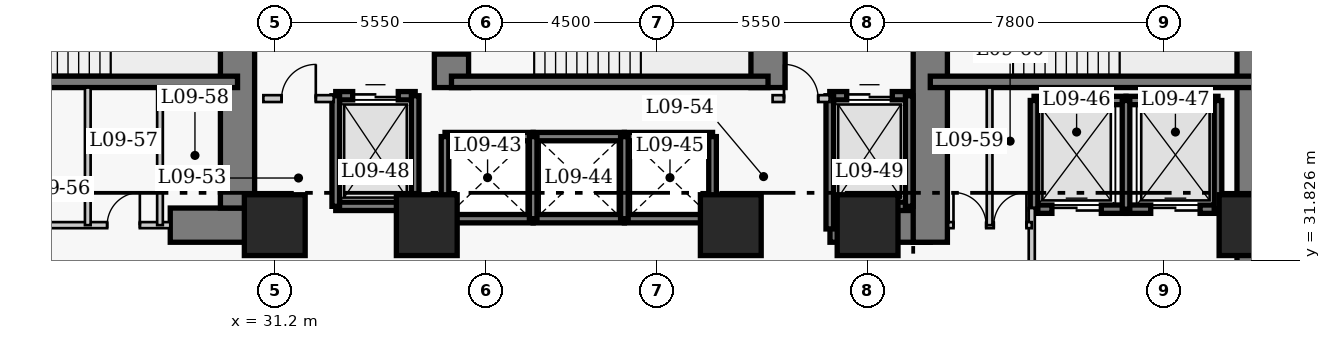
"""IFC4 building model, lengths in metres.
Left out: names, types, materials, properties, quantities, classifications, styles, units other than length and angle.
Written with IfcOpenShell. Run it as: python <this file> out.ifc"""

import sys

from ifc_helpers import new_model, si_unit, direction, frame, frame_2d, origin, origin_2d, place, context, subcontext, project, spatial, rectangle, extrude, element, fill, save


model = new_model("IFC4")
c1 = context("Model", 3, precision=1e-05, world=origin(), true_north=direction((0.0, 1.0)))
c2 = subcontext(c1, "Body", "Model", "MODEL_VIEW")
j1 = project(units=[si_unit("LENGTHUNIT", "METRE"), si_unit("PLANEANGLEUNIT", "RADIAN")], contexts=[c1])
p1 = place(None, origin())
s1 = spatial("IfcSite", under=j1, at=p1, CompositionType="ELEMENT")
p2 = place(p1, origin())
s2 = spatial("IfcBuilding", under=s1, at=p2, CompositionType="ELEMENT")
p3 = place(p2, frame((0.0, 0.0, 41.2)))
s3 = spatial("IfcBuildingStorey", under=s2, at=p3, CompositionType="ELEMENT", Elevation=41.2)
p4 = place(p3, frame((56.97, 27.05, 0.0), z_axis=(0.0, 0.0, 1.0), x_axis=(0.0, 1.0, 0.0)))
e1 = element("IfcWall", 1, at=p4, inside=s3, PredefinedType="SHEAR", context=c2, shape_type="SweptSolid", body=[
    extrude(rectangle(XDim=13.72, YDim=0.9, at=frame_2d((6.86, 0.0))), origin(), (0.0, 0.0, 1.0), 3.8),
])
p5 = place(p3, frame((28.45, 32.75, 0.0), z_axis=(0.0, 0.0, 1.0), x_axis=(1.0, 0.0, 0.0)))
e2 = element("IfcWall", 2, at=p5, inside=s3, PredefinedType="SHEAR", context=c2, shape_type="SweptSolid", body=[
    extrude(rectangle(XDim=2.4, YDim=0.9, at=frame_2d((1.2, 0.0))), origin(), (0.0, 0.0, 1.0), 3.8),
])
p6 = place(p3, frame((45.81, 32.75, 0.0), z_axis=(0.0, 0.0, 1.0), x_axis=(1.0, 0.0, 0.0)))
e3 = element("IfcWall", 3, at=p6, inside=s3, PredefinedType="SHEAR", context=c2, shape_type="SweptSolid", body=[
    extrude(rectangle(XDim=2.64, YDim=0.9, at=frame_2d((1.32, 0.0))), origin(), (0.0, 0.0, 1.0), 3.8),
])
p7 = place(p3, frame((30.22, 33.2, 0.0), z_axis=(0.0, 0.0, 1.0), x_axis=(0.0, 1.0, 0.0)))
e4 = element("IfcWall", 4, at=p7, inside=s3, PredefinedType="SHEAR", context=c2, shape_type="SweptSolid", body=[
    extrude(rectangle(XDim=7.12, YDim=0.9, at=frame_2d((3.56, 0.0))), origin(), (0.0, 0.0, 1.0), 3.8),
])
p8 = place(p3, frame((35.85, 36.37, 0.0), z_axis=(0.0, 0.0, 1.0), x_axis=(0.0, 1.0, 0.0)))
e5 = element("IfcWall", 5, at=p8, inside=s3, PredefinedType="SHEAR", context=c2, shape_type="SweptSolid", body=[
    extrude(rectangle(XDim=3.95, YDim=0.9, at=frame_2d((1.975, 0.0))), origin(), (0.0, 0.0, 1.0), 3.8),
])
p9 = place(p8, frame((0.88, 0.0, 0.0)))
e6 = element("IfcOpeningElement", 6, at=p9, cuts=e5, PredefinedType="OPENING", context=c2, shape_type="SweptSolid", body=[
    extrude(rectangle(XDim=1.1, YDim=2.15, at=frame_2d((0.55, 1.075))), frame((0.0, 0.46, 0.0), z_axis=(0.0, -1.0, 0.0), x_axis=(1.0, 0.0, 0.0)), (0.0, 0.0, 1.0), 0.92),
])
p10 = place(p3, frame((44.18, 36.37, 0.0), z_axis=(0.0, 0.0, 1.0), x_axis=(0.0, 1.0, 0.0)))
e7 = element("IfcWall", 7, at=p10, inside=s3, PredefinedType="SHEAR", context=c2, shape_type="SweptSolid", body=[
    extrude(rectangle(XDim=3.95, YDim=0.9, at=frame_2d((1.975, 0.0))), origin(), (0.0, 0.0, 1.0), 3.8),
])
p11 = place(p3, frame((48.45, 32.3, 0.0), z_axis=(0.0, 0.0, 1.0), x_axis=(0.0, 1.0, 0.0)))
e8 = element("IfcWall", 8, at=p11, inside=s3, PredefinedType="SHEAR", context=c2, shape_type="SweptSolid", body=[
    extrude(rectangle(XDim=8.02, YDim=0.9, at=frame_2d((4.01, 0.0))), origin(), (0.0, 0.0, 1.0), 3.8),
])
p12 = place(p11, frame((5.9, 0.0, 0.0)))
e9 = element("IfcOpeningElement", 9, at=p12, cuts=e8, PredefinedType="OPENING", context=c2, shape_type="SweptSolid", body=[
    extrude(rectangle(XDim=1.1, YDim=2.15, at=frame_2d((0.55, 1.075))), frame((0.0, 0.46, 0.0), z_axis=(0.0, -1.0, 0.0), x_axis=(1.0, 0.0, 0.0)), (0.0, 0.0, 1.0), 0.92),
])
p13 = place(p3, frame((21.9, 36.52, 0.0), z_axis=(0.0, 0.0, 1.0), x_axis=(1.0, 0.0, 0.0)))
e10 = element("IfcWall", 10, at=p13, inside=s3, PredefinedType="SHEAR", context=c2, shape_type="SweptSolid", body=[
    extrude(rectangle(XDim=8.32, YDim=0.3, at=frame_2d((4.16, 0.0))), origin(), (0.0, 0.0, 1.0), 3.8),
])
p14 = place(p13, frame((0.9, 0.0, 0.0)))
e11 = element("IfcOpeningElement", 11, at=p14, cuts=e10, PredefinedType="OPENING", context=c2, shape_type="SweptSolid", body=[
    extrude(rectangle(XDim=1.1, YDim=2.15, at=frame_2d((0.55, 1.075))), frame((0.0, 0.16, 0.0), z_axis=(0.0, -1.0, 0.0), x_axis=(1.0, 0.0, 0.0)), (0.0, 0.0, 1.0), 0.32),
])
p15 = place(p3, frame((35.85, 36.52, 0.0), z_axis=(0.0, 0.0, 1.0), x_axis=(1.0, 0.0, 0.0)))
e12 = element("IfcWall", 12, at=p15, inside=s3, PredefinedType="SHEAR", context=c2, shape_type="SweptSolid", body=[
    extrude(rectangle(XDim=8.33, YDim=0.3, at=frame_2d((4.165, 0.0))), origin(), (0.0, 0.0, 1.0), 3.8),
])
p16 = place(p3, frame((48.45, 36.52, 0.0), z_axis=(0.0, 0.0, 1.0), x_axis=(1.0, 0.0, 0.0)))
e13 = element("IfcWall", 13, at=p16, inside=s3, PredefinedType="SHEAR", context=c2, shape_type="SweptSolid", body=[
    extrude(rectangle(XDim=8.52, YDim=0.3, at=frame_2d((4.26, 0.0))), origin(), (0.0, 0.0, 1.0), 3.8),
])
for number, where, z_axis, x_axis in (
    (14, (31.2, 32.75, 0.0), (0.0, 0.0, 1.0), (1.0, 0.0, 0.0)),
    (15, (35.2, 32.75, 0.0), (0.0, 0.0, 1.0), (1.0, 0.0, 0.0)),
    (16, (43.2, 32.75, 0.0), (0.0, 0.0, 1.0), (1.0, 0.0, 0.0)),
    (17, (46.8, 32.75, 0.0), (0.0, 0.0, 1.0), (1.0, 0.0, 0.0)),
    (18, (56.85, 32.75, 0.0), (0.0, 0.0, 1.0), (1.0, 0.0, 0.0)),
):
    element("IfcColumn", number, at=place(p3, frame(where, z_axis=z_axis, x_axis=x_axis)), inside=s3, PredefinedType="COLUMN", context=c2, shape_type="SweptSolid", body=[
        extrude(rectangle(XDim=1.6, YDim=1.6, at=origin_2d()), origin(), (0.0, 0.0, 1.0), 3.8),
    ])
for number, where, z_axis, x_axis in (
    (19, (35.68, 35.08, 0.0), (0.0, 0.0, 1.0), (1.0, 0.0, 0.0)),
    (20, (35.68, 32.92, 0.0), (0.0, 0.0, 1.0), (1.0, 0.0, 0.0)),
):
    element("IfcWall", number, at=place(p3, frame(where, z_axis=z_axis, x_axis=x_axis)), inside=s3, PredefinedType="SHEAR", context=c2, shape_type="SweptSolid", body=[
        extrude(rectangle(XDim=2.32, YDim=0.22, at=frame_2d((1.16, 0.0))), origin(), (0.0, 0.0, 1.0), 3.8),
    ])
p17 = place(p3, frame((35.68, 32.92, 0.0), z_axis=(0.0, 0.0, 1.0), x_axis=(0.0, 1.0, 0.0)))
e21 = element("IfcWall", 21, at=p17, inside=s3, PredefinedType="SHEAR", context=c2, shape_type="SweptSolid", body=[
    extrude(rectangle(XDim=2.16, YDim=0.2, at=frame_2d((1.08, 0.0))), origin(), (0.0, 0.0, 1.0), 3.8),
])
for number, where, z_axis, x_axis in (
    (22, (38.0, 35.08, 0.0), (0.0, 0.0, 1.0), (1.0, 0.0, 0.0)),
    (23, (38.0, 32.92, 0.0), (0.0, 0.0, 1.0), (1.0, 0.0, 0.0)),
):
    element("IfcWall", number, at=place(p3, frame(where, z_axis=z_axis, x_axis=x_axis)), inside=s3, PredefinedType="SHEAR", context=c2, shape_type="SweptSolid", body=[
        extrude(rectangle(XDim=2.4, YDim=0.22, at=frame_2d((1.2, 0.0))), origin(), (0.0, 0.0, 1.0), 3.8),
    ])
p18 = place(p3, frame((38.0, 32.92, 0.0), z_axis=(0.0, 0.0, 1.0), x_axis=(0.0, 1.0, 0.0)))
e24 = element("IfcWall", 24, at=p18, inside=s3, PredefinedType="SHEAR", context=c2, shape_type="SweptSolid", body=[
    extrude(rectangle(XDim=2.16, YDim=0.2, at=frame_2d((1.08, 0.0))), origin(), (0.0, 0.0, 1.0), 3.8),
])
for number, where, z_axis, x_axis in (
    (25, (40.4, 35.08, 0.0), (0.0, 0.0, 1.0), (1.0, 0.0, 0.0)),
    (26, (40.4, 32.92, 0.0), (0.0, 0.0, 1.0), (1.0, 0.0, 0.0)),
):
    element("IfcWall", number, at=place(p3, frame(where, z_axis=z_axis, x_axis=x_axis)), inside=s3, PredefinedType="SHEAR", context=c2, shape_type="SweptSolid", body=[
        extrude(rectangle(XDim=2.32, YDim=0.22, at=frame_2d((1.16, 0.0))), origin(), (0.0, 0.0, 1.0), 3.8),
    ])
for number, where, z_axis, x_axis in (
    (27, (40.4, 32.92, 0.0), (0.0, 0.0, 1.0), (0.0, 1.0, 0.0)),
    (28, (42.72, 32.92, 0.0), (0.0, 0.0, 1.0), (0.0, 1.0, 0.0)),
):
    element("IfcWall", number, at=place(p3, frame(where, z_axis=z_axis, x_axis=x_axis)), inside=s3, PredefinedType="SHEAR", context=c2, shape_type="SweptSolid", body=[
        extrude(rectangle(XDim=2.16, YDim=0.2, at=frame_2d((1.08, 0.0))), origin(), (0.0, 0.0, 1.0), 3.8),
    ])
p19 = place(p3, frame((51.18, 36.03, 0.0), z_axis=(0.0, 0.0, 1.0), x_axis=(1.0, 0.0, 0.0)))
e29 = element("IfcWall", 29, at=p19, inside=s3, PredefinedType="SHEAR", context=c2, shape_type="SweptSolid", body=[
    extrude(rectangle(XDim=2.42, YDim=0.22, at=frame_2d((1.21, 0.0))), origin(), (0.0, 0.0, 1.0), 3.8),
])
p20 = place(p3, frame((51.18, 33.17, 0.0), z_axis=(0.0, 0.0, 1.0), x_axis=(1.0, 0.0, 0.0)))
e30 = element("IfcWall", 30, at=p20, inside=s3, PredefinedType="SHEAR", context=c2, shape_type="SweptSolid", body=[
    extrude(rectangle(XDim=2.42, YDim=0.22, at=frame_2d((1.21, 0.0))), origin(), (0.0, 0.0, 1.0), 3.8),
])
p21 = place(p20, frame((0.47, 0.0, 0.0)))
e31 = element("IfcOpeningElement", 31, at=p21, cuts=e30, PredefinedType="OPENING", context=c2, shape_type="SweptSolid", body=[
    extrude(rectangle(XDim=1.3, YDim=2.15, at=frame_2d((0.65, 1.075))), frame((0.0, 0.12, 0.0), z_axis=(0.0, -1.0, 0.0), x_axis=(1.0, 0.0, 0.0)), (0.0, 0.0, 1.0), 0.24),
])
p22 = place(p3, frame((51.18, 33.17, 0.0), z_axis=(0.0, 0.0, 1.0), x_axis=(0.0, 1.0, 0.0)))
e32 = element("IfcWall", 32, at=p22, inside=s3, PredefinedType="SHEAR", context=c2, shape_type="SweptSolid", body=[
    extrude(rectangle(XDim=2.86, YDim=0.2, at=frame_2d((1.43, 0.0))), origin(), (0.0, 0.0, 1.0), 3.8),
])
p23 = place(p3, frame((53.6, 36.03, 0.0), z_axis=(0.0, 0.0, 1.0), x_axis=(1.0, 0.0, 0.0)))
e33 = element("IfcWall", 33, at=p23, inside=s3, PredefinedType="SHEAR", context=c2, shape_type="SweptSolid", body=[
    extrude(rectangle(XDim=2.42, YDim=0.22, at=frame_2d((1.21, 0.0))), origin(), (0.0, 0.0, 1.0), 3.8),
])
p24 = place(p3, frame((53.6, 33.17, 0.0), z_axis=(0.0, 0.0, 1.0), x_axis=(1.0, 0.0, 0.0)))
e34 = element("IfcWall", 34, at=p24, inside=s3, PredefinedType="SHEAR", context=c2, shape_type="SweptSolid", body=[
    extrude(rectangle(XDim=2.42, YDim=0.22, at=frame_2d((1.21, 0.0))), origin(), (0.0, 0.0, 1.0), 3.8),
])
p25 = place(p24, frame((0.65, 0.0, 0.0)))
e35 = element("IfcOpeningElement", 35, at=p25, cuts=e34, PredefinedType="OPENING", context=c2, shape_type="SweptSolid", body=[
    extrude(rectangle(XDim=1.3, YDim=2.15, at=frame_2d((0.65, 1.075))), frame((0.0, 0.12, 0.0), z_axis=(0.0, -1.0, 0.0), x_axis=(1.0, 0.0, 0.0)), (0.0, 0.0, 1.0), 0.24),
])
for number, where, z_axis, x_axis in (
    (36, (53.6, 33.17, 0.0), (0.0, 0.0, 1.0), (0.0, 1.0, 0.0)),
    (37, (56.02, 33.17, 0.0), (0.0, 0.0, 1.0), (0.0, 1.0, 0.0)),
):
    element("IfcWall", number, at=place(p3, frame(where, z_axis=z_axis, x_axis=x_axis)), inside=s3, PredefinedType="SHEAR", context=c2, shape_type="SweptSolid", body=[
        extrude(rectangle(XDim=2.86, YDim=0.2, at=frame_2d((1.43, 0.0))), origin(), (0.0, 0.0, 1.0), 3.8),
    ])
p26 = place(p3, frame((32.805, 36.155, 0.0), z_axis=(0.0, 0.0, 1.0), x_axis=(1.0, 0.0, 0.0)))
e38 = element("IfcWall", 38, at=p26, inside=s3, PredefinedType="SHEAR", context=c2, shape_type="SweptSolid", body=[
    extrude(rectangle(XDim=2.09, YDim=0.22, at=frame_2d((1.045, 0.0))), origin(), (0.0, 0.0, 1.0), 3.8),
])
p27 = place(p26, frame((0.445, 0.0, 0.0)))
e39 = element("IfcOpeningElement", 39, at=p27, cuts=e38, PredefinedType="OPENING", context=c2, shape_type="SweptSolid", body=[
    extrude(rectangle(XDim=1.2, YDim=2.15, at=frame_2d((0.6, 1.075))), frame((0.0, 0.12, 0.0), z_axis=(0.0, -1.0, 0.0), x_axis=(1.0, 0.0, 0.0)), (0.0, 0.0, 1.0), 0.24),
])
p28 = place(p3, frame((32.805, 33.245, 0.0), z_axis=(0.0, 0.0, 1.0), x_axis=(1.0, 0.0, 0.0)))
e40 = element("IfcWall", 40, at=p28, inside=s3, PredefinedType="SHEAR", context=c2, shape_type="SweptSolid", body=[
    extrude(rectangle(XDim=2.09, YDim=0.22, at=frame_2d((1.045, 0.0))), origin(), (0.0, 0.0, 1.0), 3.8),
])
for number, where, z_axis, x_axis in (
    (41, (32.805, 33.245, 0.0), (0.0, 0.0, 1.0), (0.0, 1.0, 0.0)),
    (42, (34.895, 33.245, 0.0), (0.0, 0.0, 1.0), (0.0, 1.0, 0.0)),
):
    element("IfcWall", number, at=place(p3, frame(where, z_axis=z_axis, x_axis=x_axis)), inside=s3, PredefinedType="SHEAR", context=c2, shape_type="SweptSolid", body=[
        extrude(rectangle(XDim=2.91, YDim=0.2, at=frame_2d((1.455, 0.0))), origin(), (0.0, 0.0, 1.0), 3.8),
    ])
p29 = place(p3, frame((45.805, 36.155, 0.0), z_axis=(0.0, 0.0, 1.0), x_axis=(1.0, 0.0, 0.0)))
e43 = element("IfcWall", 43, at=p29, inside=s3, PredefinedType="SHEAR", context=c2, shape_type="SweptSolid", body=[
    extrude(rectangle(XDim=2.09, YDim=0.22, at=frame_2d((1.045, 0.0))), origin(), (0.0, 0.0, 1.0), 3.8),
])
p30 = place(p29, frame((0.445, 0.0, 0.0)))
e44 = element("IfcOpeningElement", 44, at=p30, cuts=e43, PredefinedType="OPENING", context=c2, shape_type="SweptSolid", body=[
    extrude(rectangle(XDim=1.2, YDim=2.15, at=frame_2d((0.6, 1.075))), frame((0.0, 0.12, 0.0), z_axis=(0.0, -1.0, 0.0), x_axis=(1.0, 0.0, 0.0)), (0.0, 0.0, 1.0), 0.24),
])
p31 = place(p3, frame((45.805, 33.245, 0.0), z_axis=(0.0, 0.0, 1.0), x_axis=(1.0, 0.0, 0.0)))
e45 = element("IfcWall", 45, at=p31, inside=s3, PredefinedType="SHEAR", context=c2, shape_type="SweptSolid", body=[
    extrude(rectangle(XDim=2.09, YDim=0.22, at=frame_2d((1.045, 0.0))), origin(), (0.0, 0.0, 1.0), 3.8),
])
p32 = place(p3, frame((45.805, 32.65, 0.0), z_axis=(0.0, 0.0, 1.0), x_axis=(0.0, 1.0, 0.0)))
e46 = element("IfcWall", 46, at=p32, inside=s3, PredefinedType="SHEAR", context=c2, shape_type="SweptSolid", body=[
    extrude(rectangle(XDim=3.505, YDim=0.2, at=frame_2d((1.752, 0.0))), origin(), (0.0, 0.0, 1.0), 3.8),
])
p33 = place(p3, frame((47.895, 33.245, 0.0), z_axis=(0.0, 0.0, 1.0), x_axis=(0.0, 1.0, 0.0)))
e47 = element("IfcWall", 47, at=p33, inside=s3, PredefinedType="SHEAR", context=c2, shape_type="SweptSolid", body=[
    extrude(rectangle(XDim=2.91, YDim=0.2, at=frame_2d((1.455, 0.0))), origin(), (0.0, 0.0, 1.0), 3.8),
])
p34 = place(p3, frame((30.9, 36.08, 0.0), z_axis=(0.0, 0.0, 1.0), x_axis=(1.0, 0.0, 0.0)))
e48 = element("IfcWall", 48, at=p34, inside=s3, PredefinedType="PARTITIONING", context=c2, shape_type="SweptSolid", body=[
    extrude(rectangle(XDim=1.85, YDim=0.18, at=frame_2d((0.925, 0.0))), origin(), (0.0, 0.0, 1.0), 3.54),
])
p35 = place(p34, frame((0.48, 0.0, 0.0)))
e49 = element("IfcOpeningElement", 49, at=p35, cuts=e48, PredefinedType="OPENING", context=c2, shape_type="SweptSolid", body=[
    extrude(rectangle(XDim=0.9, YDim=2.15, at=frame_2d((0.45, 1.075))), frame((0.0, 0.1, 0.0), z_axis=(0.0, -1.0, 0.0), x_axis=(1.0, 0.0, 0.0)), (0.0, 0.0, 1.0), 0.2),
])
p36 = place(p3, frame((44.3, 36.08, 0.0), z_axis=(0.0, 0.0, 1.0), x_axis=(1.0, 0.0, 0.0)))
e50 = element("IfcWall", 50, at=p36, inside=s3, PredefinedType="PARTITIONING", context=c2, shape_type="SweptSolid", body=[
    extrude(rectangle(XDim=1.5, YDim=0.18, at=frame_2d((0.75, 0.0))), origin(), (0.0, 0.0, 1.0), 3.54),
])
p37 = place(p36, frame((0.3, 0.0, 0.0)))
e51 = element("IfcOpeningElement", 51, at=p37, cuts=e50, PredefinedType="OPENING", context=c2, shape_type="SweptSolid", body=[
    extrude(rectangle(XDim=0.9, YDim=2.15, at=frame_2d((0.45, 1.075))), frame((0.0, 0.1, 0.0), z_axis=(0.0, -1.0, 0.0), x_axis=(1.0, 0.0, 0.0)), (0.0, 0.0, 1.0), 0.2),
])
p38 = place(p3, frame((51.12, 29.5, 0.0), z_axis=(0.0, 0.0, 1.0), x_axis=(0.0, 1.0, 0.0)))
e52 = element("IfcWall", 52, at=p38, inside=s3, PredefinedType="PARTITIONING", context=c2, shape_type="SweptSolid", body=[
    extrude(rectangle(XDim=3.7, YDim=0.16, at=frame_2d((1.85, 0.0))), origin(), (0.0, 0.0, 1.0), 3.54),
])
p39 = place(p38, frame((0.9, 0.0, 0.0)))
e53 = element("IfcOpeningElement", 53, at=p39, cuts=e52, PredefinedType="OPENING", context=c2, shape_type="SweptSolid", body=[
    extrude(rectangle(XDim=1.1, YDim=2.15, at=frame_2d((0.55, 1.075))), frame((0.0, 0.09, 0.0), z_axis=(0.0, -1.0, 0.0), x_axis=(1.0, 0.0, 0.0)), (0.0, 0.0, 1.0), 0.18),
])
p40 = place(p3, frame((24.48, 32.75, 0.0), z_axis=(0.0, 0.0, 1.0), x_axis=(1.0, 0.0, 0.0)))
e54 = element("IfcWall", 54, at=p40, inside=s3, PredefinedType="PARTITIONING", context=c2, shape_type="SweptSolid", body=[
    extrude(rectangle(XDim=3.97, YDim=0.16, at=frame_2d((1.985, 0.0))), origin(), (0.0, 0.0, 1.0), 3.54),
])
p41 = place(p40, frame((2.31, 0.0, 0.0)))
e55 = element("IfcOpeningElement", 55, at=p41, cuts=e54, PredefinedType="OPENING", context=c2, shape_type="SweptSolid", body=[
    extrude(rectangle(XDim=0.86, YDim=2.05, at=frame_2d((0.43, 1.025))), frame((0.0, 0.09, 0.0), z_axis=(0.0, -1.0, 0.0), x_axis=(1.0, 0.0, 0.0)), (0.0, 0.0, 1.0), 0.18),
])
p42 = place(p3, frame((48.92, 32.75, 0.0), z_axis=(0.0, 0.0, 1.0), x_axis=(1.0, 0.0, 0.0)))
e56 = element("IfcWall", 56, at=p42, inside=s3, PredefinedType="PARTITIONING", context=c2, shape_type="SweptSolid", body=[
    extrude(rectangle(XDim=2.2, YDim=0.16, at=frame_2d((1.1, 0.0))), origin(), (0.0, 0.0, 1.0), 3.54),
])
p43 = place(p42, frame((0.14, 0.0, 0.0)))
e57 = element("IfcOpeningElement", 57, at=p43, cuts=e56, PredefinedType="OPENING", context=c2, shape_type="SweptSolid", body=[
    extrude(rectangle(XDim=0.86, YDim=2.05, at=frame_2d((0.43, 1.025))), frame((0.0, 0.09, 0.0), z_axis=(0.0, -1.0, 0.0), x_axis=(1.0, 0.0, 0.0)), (0.0, 0.0, 1.0), 0.18),
])
p44 = place(p42, frame((1.2, 0.0, 0.0)))
e58 = element("IfcOpeningElement", 58, at=p44, cuts=e56, PredefinedType="OPENING", context=c2, shape_type="SweptSolid", body=[
    extrude(rectangle(XDim=0.86, YDim=2.05, at=frame_2d((0.43, 1.025))), frame((0.0, 0.09, 0.0), z_axis=(0.0, -1.0, 0.0), x_axis=(1.0, 0.0, 0.0)), (0.0, 0.0, 1.0), 0.18),
])
for number, where, z_axis, x_axis in (
    (59, (26.28, 32.75, 0.0), (0.0, 0.0, 1.0), (0.0, 1.0, 0.0)),
    (60, (28.18, 32.75, 0.0), (0.0, 0.0, 1.0), (0.0, 1.0, 0.0)),
    (61, (50.01, 32.75, 0.0), (0.0, 0.0, 1.0), (0.0, 1.0, 0.0)),
):
    element("IfcWall", number, at=place(p3, frame(where, z_axis=z_axis, x_axis=x_axis)), inside=s3, PredefinedType="PARTITIONING", context=c2, shape_type="SweptSolid", body=[
        extrude(rectangle(XDim=3.62, YDim=0.15, at=frame_2d((1.81, 0.0))), origin(), (0.0, 0.0, 1.0), 3.54),
    ])
p45 = place(p21, origin())
e62 = element("IfcDoor", 62, at=p45, inside=s3, OperationType="DOUBLE_DOOR_SLIDING", PredefinedType="DOOR", context=c2, shape_type="SweptSolid", body=[
    extrude(rectangle(XDim=1.3, YDim=2.15, at=frame_2d((0.65, 1.075))), frame((0.0, 0.025, 0.0), z_axis=(0.0, -1.0, 0.0), x_axis=(1.0, 0.0, 0.0)), (0.0, 0.0, 1.0), 0.05),
])
fill(e31, e62)
p46 = place(p25, origin())
e63 = element("IfcDoor", 63, at=p46, inside=s3, OperationType="DOUBLE_DOOR_SLIDING", PredefinedType="DOOR", context=c2, shape_type="SweptSolid", body=[
    extrude(rectangle(XDim=1.3, YDim=2.15, at=frame_2d((0.65, 1.075))), frame((0.0, 0.025, 0.0), z_axis=(0.0, -1.0, 0.0), x_axis=(1.0, 0.0, 0.0)), (0.0, 0.0, 1.0), 0.05),
])
fill(e35, e63)
p47 = place(p27, origin())
e64 = element("IfcDoor", 64, at=p47, inside=s3, OperationType="DOUBLE_DOOR_SLIDING", PredefinedType="DOOR", context=c2, shape_type="SweptSolid", body=[
    extrude(rectangle(XDim=1.2, YDim=2.15, at=frame_2d((0.6, 1.075))), frame((0.0, 0.025, 0.0), z_axis=(0.0, -1.0, 0.0), x_axis=(1.0, 0.0, 0.0)), (0.0, 0.0, 1.0), 0.05),
])
fill(e39, e64)
p48 = place(p30, origin())
e65 = element("IfcDoor", 65, at=p48, inside=s3, OperationType="DOUBLE_DOOR_SLIDING", PredefinedType="DOOR", context=c2, shape_type="SweptSolid", body=[
    extrude(rectangle(XDim=1.2, YDim=2.15, at=frame_2d((0.6, 1.075))), frame((0.0, 0.025, 0.0), z_axis=(0.0, -1.0, 0.0), x_axis=(1.0, 0.0, 0.0)), (0.0, 0.0, 1.0), 0.05),
])
fill(e44, e65)
p49 = place(p35, origin())
e66 = element("IfcDoor", 66, at=p49, inside=s3, OperationType="SINGLE_SWING_RIGHT", PredefinedType="DOOR", context=c2, shape_type="SweptSolid", body=[
    extrude(rectangle(XDim=0.9, YDim=2.15, at=frame_2d((0.45, 1.075))), frame((0.0, 0.025, 0.0), z_axis=(0.0, -1.0, 0.0), x_axis=(1.0, 0.0, 0.0)), (0.0, 0.0, 1.0), 0.05),
])
fill(e49, e66)
p50 = place(p37, origin())
e67 = element("IfcDoor", 67, at=p50, inside=s3, OperationType="SINGLE_SWING_LEFT", PredefinedType="DOOR", context=c2, shape_type="SweptSolid", body=[
    extrude(rectangle(XDim=0.9, YDim=2.15, at=frame_2d((0.45, 1.075))), frame((0.0, 0.025, 0.0), z_axis=(0.0, -1.0, 0.0), x_axis=(1.0, 0.0, 0.0)), (0.0, 0.0, 1.0), 0.05),
])
fill(e51, e67)
p51 = place(p41, origin())
e68 = element("IfcDoor", 68, at=p51, inside=s3, OperationType="SINGLE_SWING_RIGHT", PredefinedType="DOOR", context=c2, shape_type="SweptSolid", body=[
    extrude(rectangle(XDim=0.86, YDim=2.05, at=frame_2d((0.43, 1.025))), frame((0.0, 0.025, 0.0), z_axis=(0.0, -1.0, 0.0), x_axis=(1.0, 0.0, 0.0)), (0.0, 0.0, 1.0), 0.05),
])
fill(e55, e68)
p52 = place(p43, origin())
e69 = element("IfcDoor", 69, at=p52, inside=s3, OperationType="SINGLE_SWING_LEFT", PredefinedType="DOOR", context=c2, shape_type="SweptSolid", body=[
    extrude(rectangle(XDim=0.86, YDim=2.05, at=frame_2d((0.43, 1.025))), frame((0.0, 0.025, 0.0), z_axis=(0.0, -1.0, 0.0), x_axis=(1.0, 0.0, 0.0)), (0.0, 0.0, 1.0), 0.05),
])
fill(e57, e69)
p53 = place(p44, origin())
e70 = element("IfcDoor", 70, at=p53, inside=s3, OperationType="SINGLE_SWING_RIGHT", PredefinedType="DOOR", context=c2, shape_type="SweptSolid", body=[
    extrude(rectangle(XDim=0.86, YDim=2.05, at=frame_2d((0.43, 1.025))), frame((0.0, 0.025, 0.0), z_axis=(0.0, -1.0, 0.0), x_axis=(1.0, 0.0, 0.0)), (0.0, 0.0, 1.0), 0.05),
])
fill(e58, e70)
p54 = place(p9, origin())
e71 = element("IfcDoor", 71, at=p54, inside=s3, OperationType="SINGLE_SWING_RIGHT", PredefinedType="DOOR", context=c2, shape_type="SweptSolid", body=[
    extrude(rectangle(XDim=1.1, YDim=2.15, at=frame_2d((0.55, 1.075))), frame((0.0, 0.025, 0.0), z_axis=(0.0, -1.0, 0.0), x_axis=(1.0, 0.0, 0.0)), (0.0, 0.0, 1.0), 0.05),
])
fill(e6, e71)
save(model, sys.argv[1])
